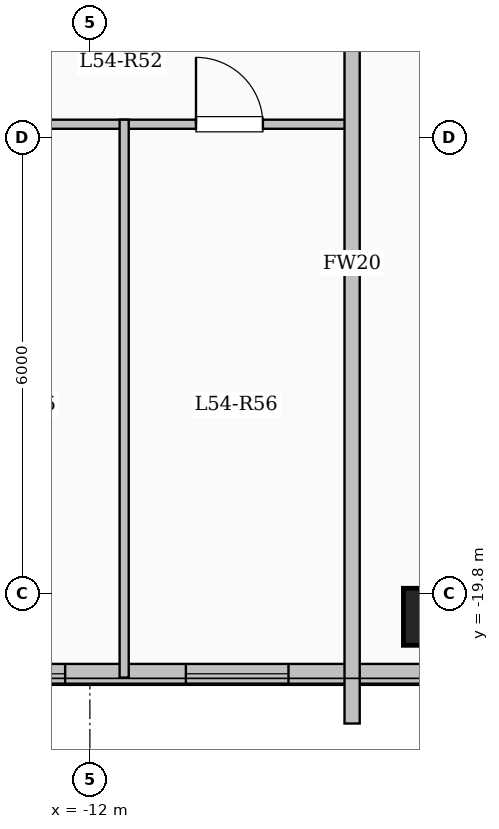
"""IFC4 building model, lengths in metres.
Left out: names, types, materials, properties, quantities, classifications, styles, units other than length and angle.
Written with IfcOpenShell. Run it as: python <this file> out.ifc"""

import sys

from ifc_helpers import new_model, si_unit, direction, frame, frame_2d, origin, origin_2d, place, context, subcontext, project, spatial, rectangle, extrude, element, fill, save


model = new_model("IFC4")
c1 = context("Model", 3, precision=1e-05, world=origin(), true_north=direction((0.0, 1.0)))
c2 = subcontext(c1, "Body", "Model", "MODEL_VIEW")
j1 = project(units=[si_unit("LENGTHUNIT", "METRE"), si_unit("PLANEANGLEUNIT", "RADIAN")], contexts=[c1])
p1 = place(None, origin())
s1 = spatial("IfcSite", under=j1, at=p1, CompositionType="ELEMENT")
p2 = place(p1, origin())
s2 = spatial("IfcBuilding", under=s1, at=p2, CompositionType="ELEMENT")
p3 = place(p2, frame((0.0, 0.0, 200.3)))
s3 = spatial("IfcBuildingStorey", under=s2, at=p3, CompositionType="ELEMENT", Elevation=200.3)
p4 = place(p3, frame((-7.5, -20.1, 0.0), z_axis=(0.0, 0.0, 1.0), x_axis=(1.0, 0.0, 0.0)))
e1 = element("IfcColumn", 1, at=p4, inside=s3, PredefinedType="COLUMN", context=c2, shape_type="SweptSolid", body=[
    extrude(rectangle(XDim=0.75, YDim=0.75, at=origin_2d()), origin(), (0.0, 0.0, 1.0), 3.35),
])
p5 = place(p3, frame((-7.35, -20.85, 0.0), z_axis=(0.0, 0.0, 1.0), x_axis=(-1.0, 0.0, 0.0)))
e2 = element("IfcWall", 2, at=p5, inside=s3, PredefinedType="SOLIDWALL", context=c2, shape_type="SweptSolid", body=[
    extrude(rectangle(XDim=11.1, YDim=0.26, at=frame_2d((5.55, 0.0))), origin(), (0.0, 0.0, 1.0), 3.1),
])
p6 = place(p5, frame((2.037, 0.0, 0.95)))
e3 = element("IfcOpeningElement", 3, at=p6, cuts=e2, PredefinedType="OPENING", context=c2, shape_type="SweptSolid", body=[
    extrude(rectangle(XDim=1.35, YDim=1.55, at=frame_2d((0.675, 0.775))), frame((0.0, 0.14, 0.0), z_axis=(0.0, -1.0, 0.0), x_axis=(1.0, 0.0, 0.0)), (0.0, 0.0, 1.0), 0.28),
])
p7 = place(p5, frame((4.976, 0.0, 0.95)))
e4 = element("IfcOpeningElement", 4, at=p7, cuts=e2, PredefinedType="OPENING", context=c2, shape_type="SweptSolid", body=[
    extrude(rectangle(XDim=1.35, YDim=1.55, at=frame_2d((0.675, 0.775))), frame((0.0, 0.14, 0.0), z_axis=(0.0, -1.0, 0.0), x_axis=(1.0, 0.0, 0.0)), (0.0, 0.0, 1.0), 0.28),
])
p8 = place(p5, frame((8.241, 0.0, 0.9)))
e5 = element("IfcOpeningElement", 5, at=p8, cuts=e2, PredefinedType="OPENING", context=c2, shape_type="SweptSolid", body=[
    extrude(rectangle(XDim=1.65, YDim=1.6, at=frame_2d((0.825, 0.8))), frame((0.0, 0.14, 0.0), z_axis=(0.0, -1.0, 0.0), x_axis=(1.0, 0.0, 0.0)), (0.0, 0.0, 1.0), 0.28),
])
p9 = place(p3, frame((-14.498, -13.62, 0.0), z_axis=(0.0, 0.0, 1.0), x_axis=(1.0, 0.0, 0.0)))
e6 = element("IfcWall", 6, at=p9, inside=s3, PredefinedType="PARTITIONING", context=c2, shape_type="SweptSolid", body=[
    extrude(rectangle(XDim=5.958, YDim=0.12, at=frame_2d((2.979, 0.0))), origin(), (0.0, 0.0, 1.0), 3.1),
])
p10 = place(p9, frame((1.005, 0.0, 0.0)))
e7 = element("IfcOpeningElement", 7, at=p10, cuts=e6, PredefinedType="OPENING", context=c2, shape_type="SweptSolid", body=[
    extrude(rectangle(XDim=0.88, YDim=2.1, at=frame_2d((0.44, 1.05))), frame((0.0, 0.07, 0.0), z_axis=(0.0, -1.0, 0.0), x_axis=(1.0, 0.0, 0.0)), (0.0, 0.0, 1.0), 0.14),
])
p11 = place(p9, frame((3.894, 0.0, 0.0)))
e8 = element("IfcOpeningElement", 8, at=p11, cuts=e6, PredefinedType="OPENING", context=c2, shape_type="SweptSolid", body=[
    extrude(rectangle(XDim=0.88, YDim=2.1, at=frame_2d((0.44, 1.05))), frame((0.0, 0.07, 0.0), z_axis=(0.0, -1.0, 0.0), x_axis=(1.0, 0.0, 0.0)), (0.0, 0.0, 1.0), 0.14),
])
p12 = place(p3, frame((-11.549, -20.9, 0.0), z_axis=(0.0, 0.0, 1.0), x_axis=(0.0, 1.0, 0.0)))
e9 = element("IfcWall", 9, at=p12, inside=s3, PredefinedType="PARTITIONING", context=c2, shape_type="SweptSolid", body=[
    extrude(rectangle(XDim=7.34, YDim=0.12, at=frame_2d((3.67, 0.0))), origin(), (0.0, 0.0, 1.0), 3.1),
])
p13 = place(p3, frame((-8.55, -21.504, 0.0), z_axis=(0.0, 0.0, 1.0), x_axis=(0.0, 1.0, 0.0)))
e10 = element("IfcWall", 10, at=p13, inside=s3, PredefinedType="SOLIDWALL", context=c2, shape_type="SweptSolid", body=[
    extrude(rectangle(XDim=12.104, YDim=0.2, at=frame_2d((6.052, 0.0))), origin(), (0.0, 0.0, 1.0), 3.1),
])
p14 = place(p6, origin())
e11 = element("IfcWindow", 11, at=p14, inside=s3, PartitioningType="SINGLE_PANEL", PredefinedType="WINDOW", context=c2, shape_type="SweptSolid", body=[
    extrude(rectangle(XDim=1.35, YDim=1.55, at=frame_2d((0.675, 0.775))), frame((0.0, 0.03, 0.0), z_axis=(0.0, -1.0, 0.0), x_axis=(1.0, 0.0, 0.0)), (0.0, 0.0, 1.0), 0.06),
])
fill(e3, e11)
p15 = place(p7, origin())
e12 = element("IfcWindow", 12, at=p15, inside=s3, PartitioningType="SINGLE_PANEL", PredefinedType="WINDOW", context=c2, shape_type="SweptSolid", body=[
    extrude(rectangle(XDim=1.35, YDim=1.55, at=frame_2d((0.675, 0.775))), frame((0.0, 0.03, 0.0), z_axis=(0.0, -1.0, 0.0), x_axis=(1.0, 0.0, 0.0)), (0.0, 0.0, 1.0), 0.06),
])
fill(e4, e12)
p16 = place(p11, origin())
e13 = element("IfcDoor", 13, at=p16, inside=s3, OperationType="SINGLE_SWING_LEFT", PredefinedType="DOOR", context=c2, shape_type="SweptSolid", body=[
    extrude(rectangle(XDim=0.88, YDim=2.1, at=frame_2d((0.44, 1.05))), frame((0.0, 0.025, 0.0), z_axis=(0.0, -1.0, 0.0), x_axis=(1.0, 0.0, 0.0)), (0.0, 0.0, 1.0), 0.05),
])
fill(e8, e13)
save(model, sys.argv[1])
